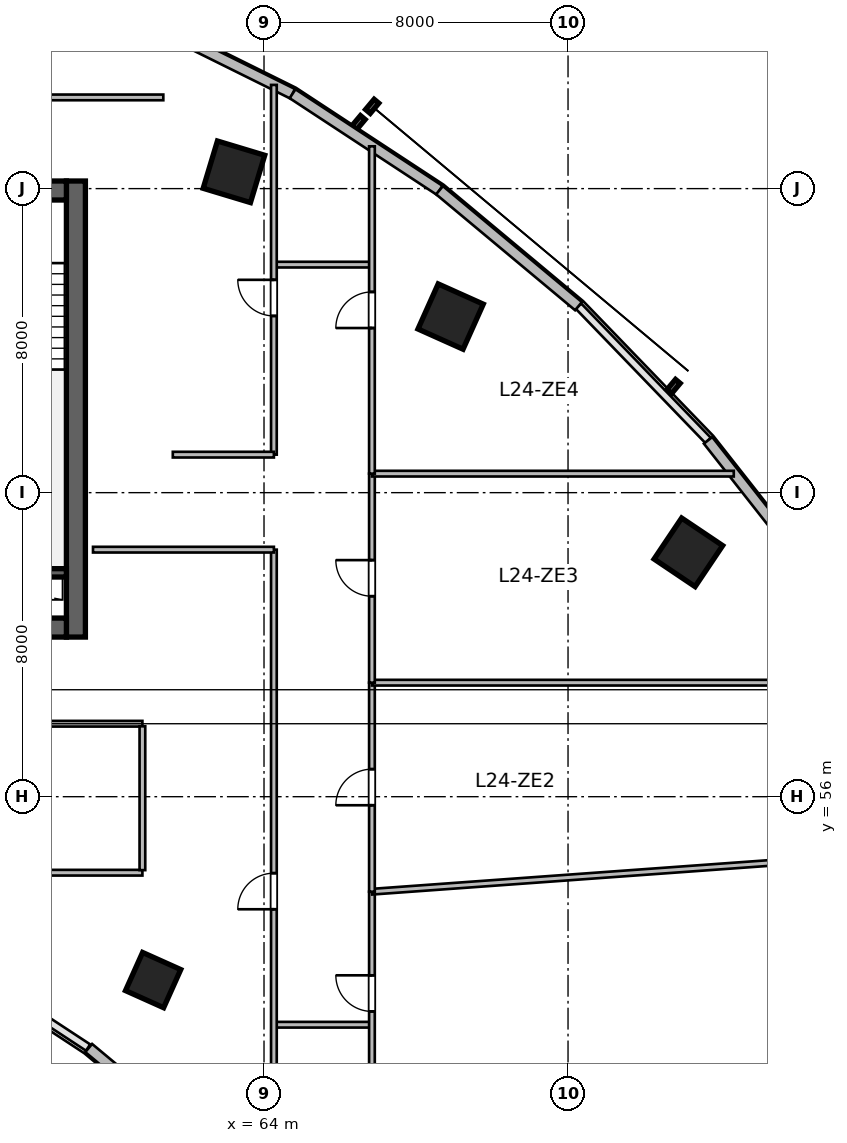
"""IFC4 building model, lengths in metres.
Left out: names, types, materials, properties, quantities, classifications, styles, units other than length and angle.
Written with IfcOpenShell. Run it as: python <this file> out.ifc"""

import sys

from ifc_helpers import new_model, si_unit, direction, frame, frame_2d, origin, origin_2d, place, context, subcontext, project, spatial, rectangle, extrude, source, transform, mapped, element, fill, save


model = new_model("IFC4")
c1 = context("Model", 3, precision=1e-05, world=origin(), true_north=direction((0.0, 1.0)))
c2 = subcontext(c1, "Body", "Model", "MODEL_VIEW")
j1 = project(units=[si_unit("LENGTHUNIT", "METRE"), si_unit("PLANEANGLEUNIT", "RADIAN")], contexts=[c1])
p1 = place(None, origin())
s1 = spatial("IfcSite", under=j1, at=p1, CompositionType="ELEMENT")
p2 = place(p1, origin())
s2 = spatial("IfcBuilding", under=s1, at=p2, CompositionType="ELEMENT")
p3 = place(p2, frame((0.0, 0.0, 103.8)))
s3 = spatial("IfcBuildingStorey", under=s2, at=p3, CompositionType="ELEMENT", Elevation=103.8)
m1 = source(origin(), c2, "Body", "SweptSolid", [
    extrude(rectangle(XDim=12.0, YDim=0.5, at=frame_2d((6.0, 0.0))), origin(), (0.0, 0.0, 1.0), 3.9),
])
p4 = place(p3, frame((59.05, 60.2, 0.0), z_axis=(0.0, 0.0, 1.0), x_axis=(0.0, 1.0, 0.0)))
e1 = element("IfcWall", 1, at=p4, inside=s3, PredefinedType="SHEAR", context=c2, shape_type="MappedRepresentation", body=[
    mapped(m1, transform((0.0, 0.0, 0.0), scale=1.0)),
])
m2 = source(origin(), c2, "Body", "SweptSolid", [
    extrude(rectangle(XDim=21.6, YDim=0.5, at=frame_2d((10.8, 0.0))), origin(), (0.0, 0.0, 1.0), 3.9),
])
p5 = place(p3, frame((37.2, 60.45, 0.0), z_axis=(0.0, 0.0, 1.0), x_axis=(1.0, 0.0, 0.0)))
e2 = element("IfcWall", 2, at=p5, inside=s3, PredefinedType="SHEAR", context=c2, shape_type="MappedRepresentation", body=[
    mapped(m2, transform((0.0, 0.0, 0.0), scale=1.0)),
])
p6 = place(p5, frame((1.1, 0.0, 0.0)))
e3 = element("IfcOpeningElement", 3, at=p6, cuts=e2, PredefinedType="OPENING", context=c2, shape_type="SweptSolid", body=[
    extrude(rectangle(XDim=1.15, YDim=2.15, at=frame_2d((0.575, 1.075))), frame((0.0, 0.26, 0.0), z_axis=(0.0, -1.0, 0.0), x_axis=(1.0, 0.0, 0.0)), (0.0, 0.0, 1.0), 0.52),
])
p7 = place(p5, frame((19.5, 0.0, 0.0)))
e4 = element("IfcOpeningElement", 4, at=p7, cuts=e2, PredefinedType="OPENING", context=c2, shape_type="SweptSolid", body=[
    extrude(rectangle(XDim=0.9, YDim=2.1, at=frame_2d((0.45, 1.05))), frame((0.0, 0.26, 0.0), z_axis=(0.0, -1.0, 0.0), x_axis=(1.0, 0.0, 0.0)), (0.0, 0.0, 1.0), 0.52),
])
p8 = place(p5, frame((12.02, 0.0, 0.0)))
e5 = element("IfcOpeningElement", 5, at=p8, cuts=e2, PredefinedType="OPENING", context=c2, shape_type="SweptSolid", body=[
    extrude(rectangle(XDim=1.6, YDim=2.15, at=frame_2d((0.8, 1.075))), frame((0.0, 0.26, 0.0), z_axis=(0.0, -1.0, 0.0), x_axis=(1.0, 0.0, 0.0)), (0.0, 0.0, 1.0), 0.52),
])
p9 = place(p3, frame((37.2, 71.95, 0.0), z_axis=(0.0, 0.0, 1.0), x_axis=(1.0, 0.0, 0.0)))
e6 = element("IfcWall", 6, at=p9, inside=s3, PredefinedType="SHEAR", context=c2, shape_type="MappedRepresentation", body=[
    mapped(m2, transform((0.0, 0.0, 0.0), scale=1.0)),
])
p10 = place(p9, frame((1.2, 0.0, 0.0)))
e7 = element("IfcOpeningElement", 7, at=p10, cuts=e6, PredefinedType="OPENING", context=c2, shape_type="SweptSolid", body=[
    extrude(rectangle(XDim=0.9, YDim=2.1, at=frame_2d((0.45, 1.05))), frame((0.0, 0.26, 0.0), z_axis=(0.0, -1.0, 0.0), x_axis=(1.0, 0.0, 0.0)), (0.0, 0.0, 1.0), 0.52),
])
p11 = place(p9, frame((14.7, 0.0, 0.0)))
e8 = element("IfcOpeningElement", 8, at=p11, cuts=e6, PredefinedType="OPENING", context=c2, shape_type="SweptSolid", body=[
    extrude(rectangle(XDim=1.2, YDim=2.15, at=frame_2d((0.6, 1.075))), frame((0.0, 0.26, 0.0), z_axis=(0.0, -1.0, 0.0), x_axis=(1.0, 0.0, 0.0)), (0.0, 0.0, 1.0), 0.52),
])
p12 = place(p9, frame((4.15, 0.0, 0.0)))
e9 = element("IfcOpeningElement", 9, at=p12, cuts=e6, PredefinedType="OPENING", context=c2, shape_type="SweptSolid", body=[
    extrude(rectangle(XDim=1.3, YDim=2.15, at=frame_2d((0.65, 1.075))), frame((0.0, 0.26, 0.0), z_axis=(0.0, -1.0, 0.0), x_axis=(1.0, 0.0, 0.0)), (0.0, 0.0, 1.0), 0.52),
])
p13 = place(p9, frame((7.25, 0.0, 0.0)))
e10 = element("IfcOpeningElement", 10, at=p13, cuts=e6, PredefinedType="OPENING", context=c2, shape_type="SweptSolid", body=[
    extrude(rectangle(XDim=0.9, YDim=2.1, at=frame_2d((0.45, 1.05))), frame((0.0, 0.26, 0.0), z_axis=(0.0, -1.0, 0.0), x_axis=(1.0, 0.0, 0.0)), (0.0, 0.0, 1.0), 0.52),
])
p14 = place(p9, frame((10.95, 0.0, 0.0)))
e11 = element("IfcOpeningElement", 11, at=p14, cuts=e6, PredefinedType="OPENING", context=c2, shape_type="SweptSolid", body=[
    extrude(rectangle(XDim=0.9, YDim=2.1, at=frame_2d((0.45, 1.05))), frame((0.0, 0.26, 0.0), z_axis=(0.0, -1.0, 0.0), x_axis=(1.0, 0.0, 0.0)), (0.0, 0.0, 1.0), 0.52),
])
m3 = source(origin(), c2, "Body", "SweptSolid", [
    extrude(rectangle(XDim=3.27, YDim=0.22, at=frame_2d((1.635, 0.0))), origin(), (0.0, 0.0, 1.0), 3.9),
])
p15 = place(p3, frame((55.53, 61.89, 0.0), z_axis=(0.0, 0.0, 1.0), x_axis=(1.0, 0.0, 0.0)))
e12 = element("IfcWall", 12, at=p15, inside=s3, PredefinedType="SHEAR", context=c2, shape_type="MappedRepresentation", body=[
    mapped(m3, transform((0.0, 0.0, 0.0), scale=1.0)),
])
m4 = source(origin(), c2, "Body", "SweptSolid", [
    extrude(rectangle(XDim=1.3, YDim=1.3, at=origin_2d()), origin(), (0.0, 0.0, 1.0), 3.9),
])
p16 = place(p3, frame((63.209, 72.442, 0.0), z_axis=(0.0, 0.0, 1.0), x_axis=(0.288697611798, 0.957420330337, 0.0)))
e13 = element("IfcColumn", 13, at=p16, inside=s3, PredefinedType="COLUMN", context=c2, shape_type="MappedRepresentation", body=[
    mapped(m4, transform((0.0, 0.0, 0.0), scale=1.0)),
])
m5 = source(origin(), c2, "Body", "SweptSolid", [
    extrude(rectangle(XDim=1.1, YDim=1.1, at=origin_2d()), origin(), (0.0, 0.0, 1.0), 3.9),
])
p17 = place(p3, frame((61.082, 51.175, 0.0), z_axis=(0.0, 0.0, 1.0), x_axis=(0.409126902895, 0.912477494148, 0.0)))
e14 = element("IfcColumn", 14, at=p17, inside=s3, PredefinedType="COLUMN", context=c2, shape_type="MappedRepresentation", body=[
    mapped(m5, transform((0.0, 0.0, 0.0), scale=1.0)),
])
for number, where, z_axis, x_axis in (
    (15, (68.91, 68.633, 0.0), (0.0, 0.0, 1.0), (0.409, 0.912, 0.0)),
    (16, (75.167, 62.43, 0.0), (0.0, 0.0, 1.0), (0.558, 0.83, 0.0)),
):
    element("IfcColumn", number, at=place(p3, frame(where, z_axis=z_axis, x_axis=x_axis)), inside=s3, PredefinedType="COLUMN", context=c2, shape_type="MappedRepresentation", body=[
        mapped(m4, transform((0.0, 0.0, 0.0), scale=1.0)),
    ])
m6 = source(origin(), c2, "Body", "SweptSolid", [
    extrude(rectangle(XDim=2.601, YDim=0.28, at=frame_2d((1.3, 0.0))), origin(), (0.0, 0.0, 1.0), 3.65),
])
p18 = place(p3, frame((61.385, 47.721, 0.0), z_axis=(0.0, 0.0, 1.0), x_axis=(-0.76796730295, 0.640489048775, 0.0)))
e17 = element("IfcWall", 17, at=p18, inside=s3, PredefinedType="SOLIDWALL", context=c2, shape_type="MappedRepresentation", body=[
    mapped(m6, transform((0.0, 0.0, 0.0), scale=1.0)),
])
m7 = source(origin(), c2, "Body", "SweptSolid", [
    extrude(rectangle(XDim=4.506, YDim=0.28, at=frame_2d((2.253, 0.0))), origin(), (0.0, 0.0, 1.0), 3.65),
])
p19 = place(p3, frame((60.714, 76.497, 0.0), z_axis=(0.0, 0.0, 1.0), x_axis=(0.89597155075, -0.444111450254, 0.0)))
e18 = element("IfcWall", 18, at=p19, inside=s3, PredefinedType="SOLIDWALL", context=c2, shape_type="MappedRepresentation", body=[
    mapped(m7, transform((0.0, 0.0, 0.0), scale=1.0)),
])
m8 = source(origin(), c2, "Body", "SweptSolid", [
    extrude(rectangle(XDim=4.626, YDim=0.28, at=frame_2d((2.313, 0.0))), origin(), (0.0, 0.0, 1.0), 3.65),
])
p20 = place(p3, frame((64.751, 74.496, 0.0), z_axis=(0.0, 0.0, 1.0), x_axis=(0.83595938331, -0.548791316855, 0.0)))
e19 = element("IfcWall", 19, at=p20, inside=s3, PredefinedType="SOLIDWALL", context=c2, shape_type="MappedRepresentation", body=[
    mapped(m8, transform((0.0, 0.0, 0.0), scale=1.0)),
])
m9 = source(origin(), c2, "Body", "SweptSolid", [
    extrude(rectangle(XDim=4.762, YDim=0.28, at=frame_2d((2.381, 0.0))), origin(), (0.0, 0.0, 1.0), 3.65),
])
p21 = place(p3, frame((68.618, 71.958, 0.0), z_axis=(0.0, 0.0, 1.0), x_axis=(0.767952279762, -0.640507061638, 0.0)))
e20 = element("IfcWall", 20, at=p21, inside=s3, PredefinedType="SOLIDWALL", context=c2, shape_type="MappedRepresentation", body=[
    mapped(m9, transform((0.0, 0.0, 0.0), scale=1.0)),
])
m10 = source(origin(), c2, "Body", "SweptSolid", [
    extrude(rectangle(XDim=5.058, YDim=0.28, at=frame_2d((2.529, 0.0))), origin(), (0.0, 0.0, 1.0), 3.65),
])
p22 = place(p3, frame((75.685, 65.376, 0.0), z_axis=(0.0, 0.0, 1.0), x_axis=(0.618145507434, -0.786063694391, 0.0)))
e21 = element("IfcWall", 21, at=p22, inside=s3, PredefinedType="SOLIDWALL", context=c2, shape_type="MappedRepresentation", body=[
    mapped(m10, transform((0.0, 0.0, 0.0), scale=1.0)),
])
m11 = source(origin(), c2, "Body", "SweptSolid", [
    extrude(rectangle(XDim=6.6, YDim=0.15, at=frame_2d((3.3, 0.0))), origin(), (0.0, 0.0, 1.0), 3.095),
])
p23 = place(p3, frame((54.2, 54.0, 0.0), z_axis=(0.0, 0.0, 1.0), x_axis=(1.0, 0.0, 0.0)))
e22 = element("IfcWall", 22, at=p23, inside=s3, PredefinedType="PARTITIONING", context=c2, shape_type="MappedRepresentation", body=[
    mapped(m11, transform((0.0, 0.0, 0.0), scale=1.0)),
])
m12 = source(origin(), c2, "Body", "SweptSolid", [
    extrude(rectangle(XDim=6.6, YDim=0.15, at=frame_2d((3.3, 0.0))), origin(), (0.0, 0.0, 1.0), 3.65),
])
p24 = place(p3, frame((54.2, 57.92, 0.0), z_axis=(0.0, 0.0, 1.0), x_axis=(1.0, 0.0, 0.0)))
e23 = element("IfcWall", 23, at=p24, inside=s3, PredefinedType="PARTITIONING", context=c2, shape_type="MappedRepresentation", body=[
    mapped(m12, transform((0.0, 0.0, 0.0), scale=1.0)),
])
p25 = place(p24, frame((2.825, 0.0, 0.0)))
e24 = element("IfcOpeningElement", 24, at=p25, cuts=e23, PredefinedType="OPENING", context=c2, shape_type="SweptSolid", body=[
    extrude(rectangle(XDim=0.95, YDim=2.1, at=frame_2d((0.475, 1.05))), frame((0.0, 0.085, 0.0), z_axis=(0.0, -1.0, 0.0), x_axis=(1.0, 0.0, 0.0)), (0.0, 0.0, 1.0), 0.17),
])
m13 = source(origin(), c2, "Body", "SweptSolid", [
    extrude(rectangle(XDim=3.785, YDim=0.15, at=frame_2d((1.893, 0.0))), origin(), (0.0, 0.0, 1.0), 3.65),
])
p26 = place(p3, frame((60.8, 54.067, 0.0), z_axis=(0.0, 0.0, 1.0), x_axis=(0.0, 1.0, 0.0)))
e25 = element("IfcWall", 25, at=p26, inside=s3, PredefinedType="PARTITIONING", context=c2, shape_type="MappedRepresentation", body=[
    mapped(m13, transform((0.0, 0.0, 0.0), scale=1.0)),
])
m14 = source(origin(), c2, "Body", "SweptSolid", [
    extrude(rectangle(XDim=2.5, YDim=0.15, at=frame_2d((1.25, 0.0))), origin(), (0.0, 0.0, 1.0), 3.65),
])
for number, where, z_axis, x_axis in (
    (26, (64.3, 50.0, 0.0), (0.0, 0.0, 1.0), (1.0, 0.0, 0.0)),
    (27, (64.3, 70.0, 0.0), (0.0, 0.0, 1.0), (1.0, 0.0, 0.0)),
):
    element("IfcWall", number, at=place(p3, frame(where, z_axis=z_axis, x_axis=x_axis)), inside=s3, PredefinedType="PARTITIONING", context=c2, shape_type="MappedRepresentation", body=[
        mapped(m14, transform((0.0, 0.0, 0.0), scale=1.0)),
    ])
m15 = source(origin(), c2, "Body", "SweptSolid", [
    extrude(rectangle(XDim=12.894, YDim=0.15, at=frame_2d((6.447, 0.0))), origin(), (0.0, 0.0, 1.0), 2.942),
])
p27 = place(p3, frame((66.84, 40.606, 0.0), z_axis=(0.0, 0.0, 1.0), x_axis=(0.0, 1.0, 0.0)))
e28 = element("IfcWall", 28, at=p27, inside=s3, PredefinedType="PARTITIONING", context=c2, shape_type="MappedRepresentation", body=[
    mapped(m15, transform((0.0, 0.0, 0.0), scale=1.0)),
])
p28 = place(p27, frame((9.744, 0.0, 0.0)))
e29 = element("IfcOpeningElement", 29, at=p28, cuts=e28, PredefinedType="OPENING", context=c2, shape_type="SweptSolid", body=[
    extrude(rectangle(XDim=0.95, YDim=2.1, at=frame_2d((0.475, 1.05))), frame((0.0, 0.085, 0.0), z_axis=(0.0, -1.0, 0.0), x_axis=(1.0, 0.0, 0.0)), (0.0, 0.0, 1.0), 0.17),
])
m16 = source(origin(), c2, "Body", "SweptSolid", [
    extrude(rectangle(XDim=15.924, YDim=0.15, at=frame_2d((7.962, 0.0))), origin(), (0.0, 0.0, 1.0), 3.65),
])
p29 = place(p3, frame((66.84, 53.5, 0.0), z_axis=(0.0, 0.0, 1.0), x_axis=(0.997397082693, 0.072104503572, 0.0)))
e30 = element("IfcWall", 30, at=p29, inside=s3, PredefinedType="PARTITIONING", context=c2, shape_type="MappedRepresentation", body=[
    mapped(m16, transform((0.0, 0.0, 0.0), scale=1.0)),
])
m17 = source(origin(), c2, "Body", "SweptSolid", [
    extrude(rectangle(XDim=5.5, YDim=0.15, at=frame_2d((2.75, 0.0))), origin(), (0.0, 0.0, 1.0), 3.022),
])
p30 = place(p3, frame((66.84, 53.5, 0.0), z_axis=(0.0, 0.0, 1.0), x_axis=(0.0, 1.0, 0.0)))
e31 = element("IfcWall", 31, at=p30, inside=s3, PredefinedType="PARTITIONING", context=c2, shape_type="MappedRepresentation", body=[
    mapped(m17, transform((0.0, 0.0, 0.0), scale=1.0)),
])
p31 = place(p30, frame((2.275, 0.0, 0.0)))
e32 = element("IfcOpeningElement", 32, at=p31, cuts=e31, PredefinedType="OPENING", context=c2, shape_type="SweptSolid", body=[
    extrude(rectangle(XDim=0.95, YDim=2.1, at=frame_2d((0.475, 1.05))), frame((0.0, 0.085, 0.0), z_axis=(0.0, -1.0, 0.0), x_axis=(1.0, 0.0, 0.0)), (0.0, 0.0, 1.0), 0.17),
])
m18 = source(origin(), c2, "Body", "SweptSolid", [
    extrude(rectangle(XDim=13.5, YDim=0.15, at=frame_2d((6.75, 0.0))), origin(), (0.0, 0.0, 1.0), 3.65),
])
p32 = place(p3, frame((66.84, 59.0, 0.0), z_axis=(0.0, 0.0, 1.0), x_axis=(1.0, 0.0, 0.0)))
e33 = element("IfcWall", 33, at=p32, inside=s3, PredefinedType="PARTITIONING", context=c2, shape_type="MappedRepresentation", body=[
    mapped(m18, transform((0.0, 0.0, 0.0), scale=1.0)),
])
m19 = source(origin(), c2, "Body", "SweptSolid", [
    extrude(rectangle(XDim=5.5, YDim=0.15, at=frame_2d((2.75, 0.0))), origin(), (0.0, 0.0, 1.0), 2.942),
])
p33 = place(p3, frame((66.84, 59.0, 0.0), z_axis=(0.0, 0.0, 1.0), x_axis=(0.0, 1.0, 0.0)))
e34 = element("IfcWall", 34, at=p33, inside=s3, PredefinedType="PARTITIONING", context=c2, shape_type="MappedRepresentation", body=[
    mapped(m19, transform((0.0, 0.0, 0.0), scale=1.0)),
])
p34 = place(p33, frame((2.275, 0.0, 0.0)))
e35 = element("IfcOpeningElement", 35, at=p34, cuts=e34, PredefinedType="OPENING", context=c2, shape_type="SweptSolid", body=[
    extrude(rectangle(XDim=0.95, YDim=2.1, at=frame_2d((0.475, 1.05))), frame((0.0, 0.085, 0.0), z_axis=(0.0, -1.0, 0.0), x_axis=(1.0, 0.0, 0.0)), (0.0, 0.0, 1.0), 0.17),
])
m20 = source(origin(), c2, "Body", "SweptSolid", [
    extrude(rectangle(XDim=9.521, YDim=0.15, at=frame_2d((4.761, 0.0))), origin(), (0.0, 0.0, 1.0), 3.65),
])
p35 = place(p3, frame((66.84, 64.5, 0.0), z_axis=(0.0, 0.0, 1.0), x_axis=(1.0, 0.0, 0.0)))
e36 = element("IfcWall", 36, at=p35, inside=s3, PredefinedType="PARTITIONING", context=c2, shape_type="MappedRepresentation", body=[
    mapped(m20, transform((0.0, 0.0, 0.0), scale=1.0)),
])
m21 = source(origin(), c2, "Body", "SweptSolid", [
    extrude(rectangle(XDim=8.613, YDim=0.15, at=frame_2d((4.307, 0.0))), origin(), (0.0, 0.0, 1.0), 3.65),
])
p36 = place(p3, frame((66.84, 64.5, 0.0), z_axis=(0.0, 0.0, 1.0), x_axis=(0.0, 1.0, 0.0)))
e37 = element("IfcWall", 37, at=p36, inside=s3, PredefinedType="PARTITIONING", context=c2, shape_type="MappedRepresentation", body=[
    mapped(m21, transform((0.0, 0.0, 0.0), scale=1.0)),
])
p37 = place(p36, frame((3.832, 0.0, 0.0)))
e38 = element("IfcOpeningElement", 38, at=p37, cuts=e37, PredefinedType="OPENING", context=c2, shape_type="SweptSolid", body=[
    extrude(rectangle(XDim=0.95, YDim=2.1, at=frame_2d((0.475, 1.05))), frame((0.0, 0.085, 0.0), z_axis=(0.0, -1.0, 0.0), x_axis=(1.0, 0.0, 0.0)), (0.0, 0.0, 1.0), 0.17),
])
m22 = source(origin(), c2, "Body", "SweptSolid", [
    extrude(rectangle(XDim=8.2, YDim=0.15, at=frame_2d((4.1, 0.0))), origin(), (0.0, 0.0, 1.0), 3.022),
])
p38 = place(p3, frame((53.15, 74.4, 0.0), z_axis=(0.0, 0.0, 1.0), x_axis=(1.0, 0.0, 0.0)))
e39 = element("IfcWall", 39, at=p38, inside=s3, PredefinedType="PARTITIONING", context=c2, shape_type="MappedRepresentation", body=[
    mapped(m22, transform((0.0, 0.0, 0.0), scale=1.0)),
])
p39 = place(p38, frame((3.625, 0.0, 0.0)))
e40 = element("IfcOpeningElement", 40, at=p39, cuts=e39, PredefinedType="OPENING", context=c2, shape_type="SweptSolid", body=[
    extrude(rectangle(XDim=0.95, YDim=2.1, at=frame_2d((0.475, 1.05))), frame((0.0, 0.085, 0.0), z_axis=(0.0, -1.0, 0.0), x_axis=(1.0, 0.0, 0.0)), (0.0, 0.0, 1.0), 0.17),
])
m23 = source(origin(), c2, "Body", "SweptSolid", [
    extrude(rectangle(XDim=17.974, YDim=0.15, at=frame_2d((8.987, 0.0))), origin(), (0.0, 0.0, 1.0), 2.942),
])
p40 = place(p3, frame((64.26, 44.526, 0.0), z_axis=(0.0, 0.0, 1.0), x_axis=(0.0, 1.0, 0.0)))
e41 = element("IfcWall", 41, at=p40, inside=s3, PredefinedType="PARTITIONING", context=c2, shape_type="MappedRepresentation", body=[
    mapped(m23, transform((0.0, 0.0, 0.0), scale=1.0)),
])
p41 = place(p40, frame((8.512, 0.0, 0.0)))
e42 = element("IfcOpeningElement", 42, at=p41, cuts=e41, PredefinedType="OPENING", context=c2, shape_type="SweptSolid", body=[
    extrude(rectangle(XDim=0.95, YDim=2.1, at=frame_2d((0.475, 1.05))), frame((0.0, 0.085, 0.0), z_axis=(0.0, -1.0, 0.0), x_axis=(1.0, 0.0, 0.0)), (0.0, 0.0, 1.0), 0.17),
])
m24 = source(origin(), c2, "Body", "SweptSolid", [
    extrude(rectangle(XDim=4.76, YDim=0.15, at=frame_2d((2.38, 0.0))), origin(), (0.0, 0.0, 1.0), 3.65),
])
p42 = place(p3, frame((59.5, 62.5, 0.0), z_axis=(0.0, 0.0, 1.0), x_axis=(1.0, 0.0, 0.0)))
e43 = element("IfcWall", 43, at=p42, inside=s3, PredefinedType="PARTITIONING", context=c2, shape_type="MappedRepresentation", body=[
    mapped(m24, transform((0.0, 0.0, 0.0), scale=1.0)),
])
m25 = source(origin(), c2, "Body", "SweptSolid", [
    extrude(rectangle(XDim=9.729, YDim=0.15, at=frame_2d((4.864, 0.0))), origin(), (0.0, 0.0, 1.0), 3.65),
])
p43 = place(p3, frame((64.26, 65.0, 0.0), z_axis=(0.0, 0.0, 1.0), x_axis=(0.0, 1.0, 0.0)))
e44 = element("IfcWall", 44, at=p43, inside=s3, PredefinedType="PARTITIONING", context=c2, shape_type="MappedRepresentation", body=[
    mapped(m25, transform((0.0, 0.0, 0.0), scale=1.0)),
])
p44 = place(p43, frame((3.65, 0.0, 0.0)))
e45 = element("IfcOpeningElement", 45, at=p44, cuts=e44, PredefinedType="OPENING", context=c2, shape_type="SweptSolid", body=[
    extrude(rectangle(XDim=0.95, YDim=2.1, at=frame_2d((0.475, 1.05))), frame((0.0, 0.085, 0.0), z_axis=(0.0, -1.0, 0.0), x_axis=(1.0, 0.0, 0.0)), (0.0, 0.0, 1.0), 0.17),
])
m26 = source(origin(), c2, "Body", "SweptSolid", [
    extrude(rectangle(XDim=2.66, YDim=0.15, at=frame_2d((1.33, 0.0))), origin(), (0.0, 0.0, 1.0), 3.65),
])
p45 = place(p3, frame((61.6, 65.0, 0.0), z_axis=(0.0, 0.0, 1.0), x_axis=(1.0, 0.0, 0.0)))
e46 = element("IfcWall", 46, at=p45, inside=s3, PredefinedType="PARTITIONING", context=c2, shape_type="MappedRepresentation", body=[
    mapped(m26, transform((0.0, 0.0, 0.0), scale=1.0)),
])
m27 = source(origin(), c2, "Body", "SweptSolid", [
    extrude(rectangle(XDim=0.95, YDim=2.1, at=frame_2d((0.475, 1.05))), frame((0.0, 0.025, 0.0), z_axis=(0.0, -1.0, 0.0), x_axis=(1.0, 0.0, 0.0)), (0.0, 0.0, 1.0), 0.05),
])
p46 = place(p28, origin())
e47 = element("IfcDoor", 47, at=p46, inside=s3, OperationType="SINGLE_SWING_RIGHT", PredefinedType="DOOR", context=c2, shape_type="MappedRepresentation", body=[
    mapped(m27, transform((0.0, 0.0, 0.0), scale=1.0)),
])
fill(e29, e47)
p47 = place(p31, origin())
e48 = element("IfcDoor", 48, at=p47, inside=s3, OperationType="SINGLE_SWING_LEFT", PredefinedType="DOOR", context=c2, shape_type="MappedRepresentation", body=[
    mapped(m27, transform((0.0, 0.0, 0.0), scale=1.0)),
])
fill(e32, e48)
p48 = place(p34, origin())
e49 = element("IfcDoor", 49, at=p48, inside=s3, OperationType="SINGLE_SWING_RIGHT", PredefinedType="DOOR", context=c2, shape_type="MappedRepresentation", body=[
    mapped(m27, transform((0.0, 0.0, 0.0), scale=1.0)),
])
fill(e35, e49)
p49 = place(p37, origin())
e50 = element("IfcDoor", 50, at=p49, inside=s3, OperationType="SINGLE_SWING_LEFT", PredefinedType="DOOR", context=c2, shape_type="MappedRepresentation", body=[
    mapped(m27, transform((0.0, 0.0, 0.0), scale=1.0)),
])
fill(e38, e50)
p50 = place(p41, origin())
e51 = element("IfcDoor", 51, at=p50, inside=s3, OperationType="SINGLE_SWING_LEFT", PredefinedType="DOOR", context=c2, shape_type="MappedRepresentation", body=[
    mapped(m27, transform((0.0, 0.0, 0.0), scale=1.0)),
])
fill(e42, e51)
p51 = place(p44, origin())
e52 = element("IfcDoor", 52, at=p51, inside=s3, OperationType="SINGLE_SWING_RIGHT", PredefinedType="DOOR", context=c2, shape_type="MappedRepresentation", body=[
    mapped(m27, transform((0.0, 0.0, 0.0), scale=1.0)),
])
fill(e45, e52)
save(model, sys.argv[1])
